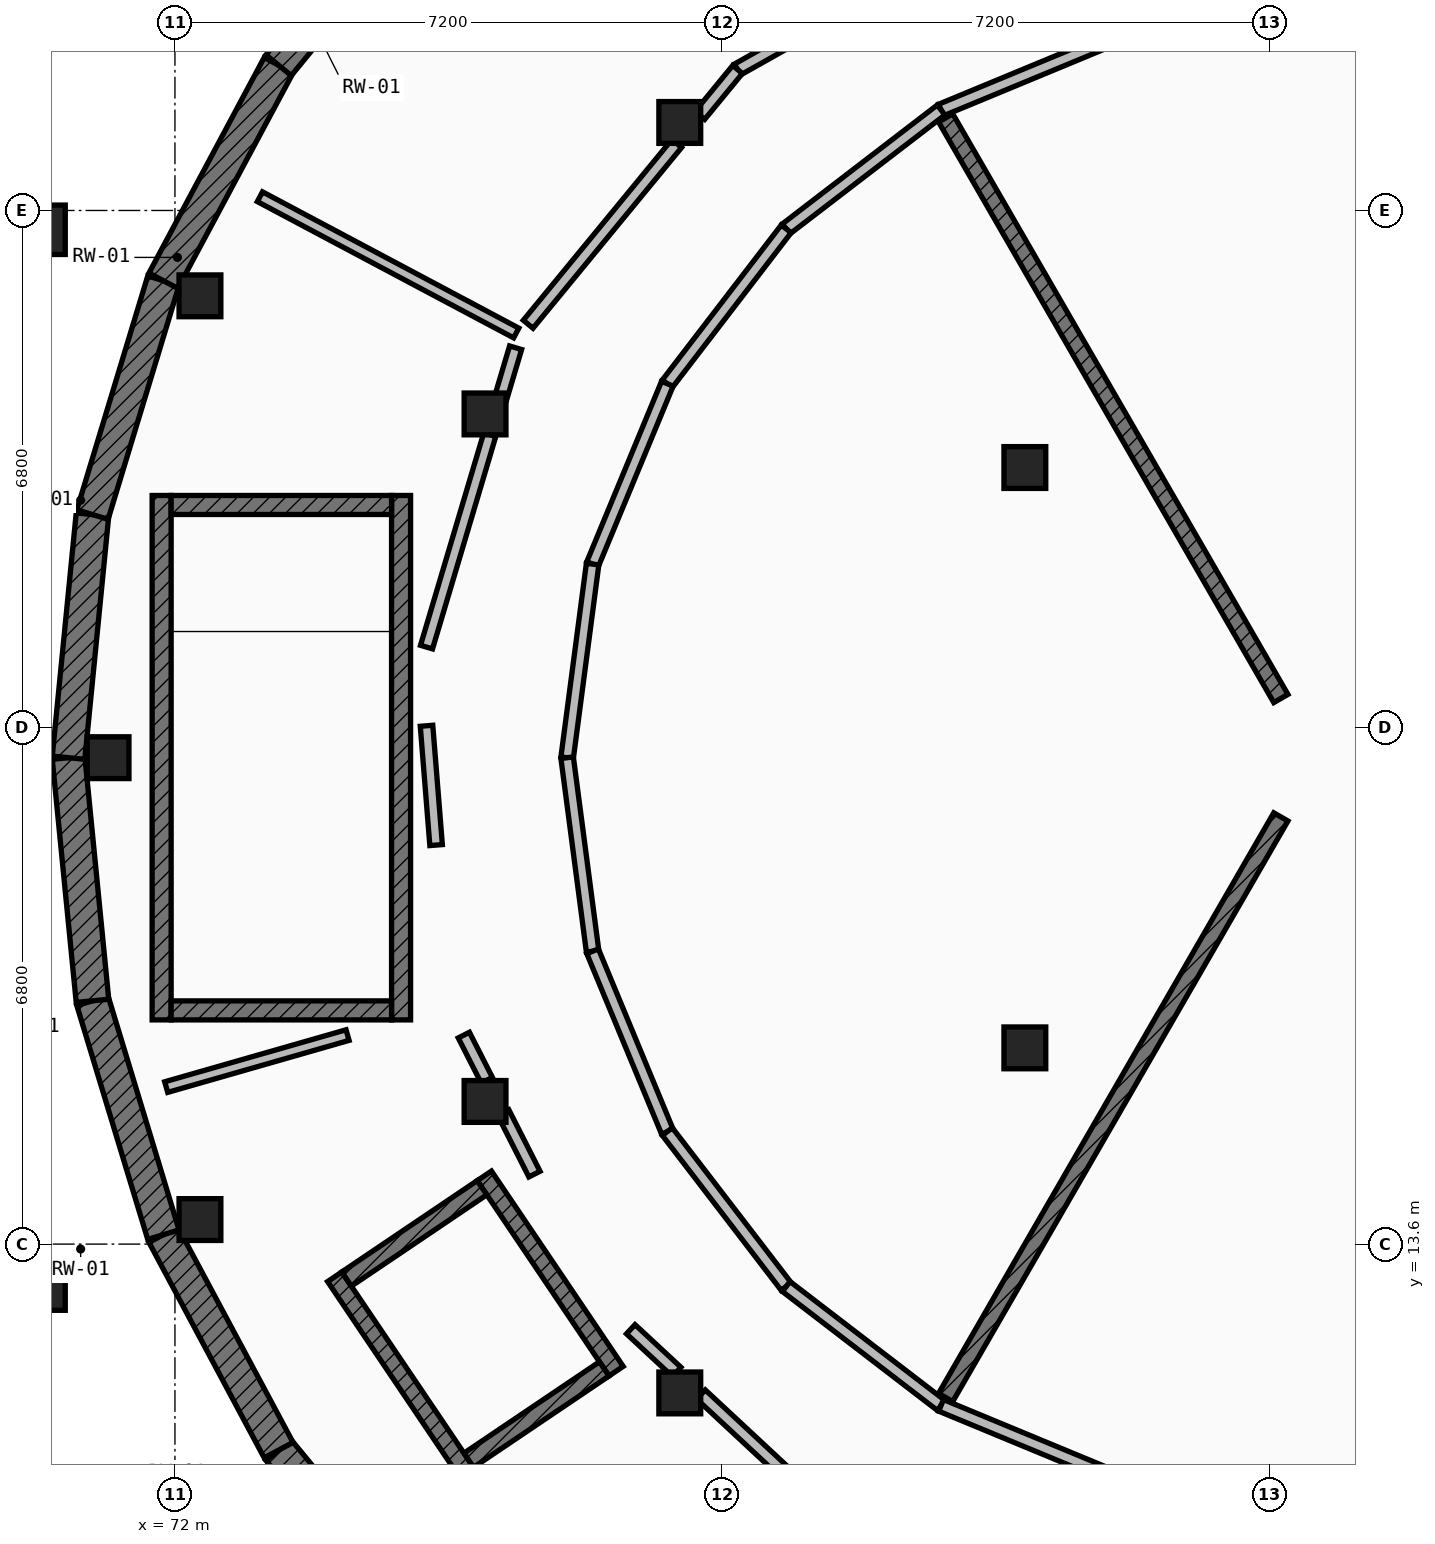
"""IFC4 building model, lengths in metres.
Left out: names, types, materials, properties, quantities, classifications, styles, units other than length and angle.
Written with IfcOpenShell. Run it as: python <this file> out.ifc"""

import sys

from ifc_helpers import new_model, si_unit, direction, frame, frame_2d, origin, origin_2d, place, context, subcontext, project, spatial, rectangle, extrude, element, fill, save


model = new_model("IFC4")
c1 = context("Model", 3, precision=1e-05, world=origin(), true_north=direction((0.0, 1.0)))
c2 = subcontext(c1, "Body", "Model", "MODEL_VIEW")
j1 = project(units=[si_unit("LENGTHUNIT", "METRE"), si_unit("PLANEANGLEUNIT", "RADIAN")], contexts=[c1])
p1 = place(None, origin())
s1 = spatial("IfcSite", under=j1, at=p1, CompositionType="ELEMENT")
p2 = place(p1, origin())
s2 = spatial("IfcBuilding", under=s1, at=p2, CompositionType="ELEMENT")
p3 = place(p2, frame((0.0, 0.0, -4.55)))
s3 = spatial("IfcBuildingStorey", under=s2, at=p3, CompositionType="ELEMENT", Elevation=-4.55)
for number, where, z_axis, x_axis in (
    (1, (72.329, 26.077, 0.0), (0.0, 0.0, 1.0), (1.0, 0.0, 0.0)),
    (2, (71.12, 20.0, 0.0), (0.0, 0.0, 1.0), (1.0, 0.0, 0.0)),
    (3, (72.329, 13.923, 0.0), (0.0, 0.0, 1.0), (1.0, 0.0, 0.0)),
    (4, (78.642, 28.358, 0.0), (0.0, 0.0, 1.0), (1.0, 0.0, 0.0)),
    (5, (76.08, 24.523, 0.0), (0.0, 0.0, 1.0), (1.0, 0.0, 0.0)),
    (6, (76.08, 15.477, 0.0), (0.0, 0.0, 1.0), (1.0, 0.0, 0.0)),
    (7, (78.642, 11.642, 0.0), (0.0, 0.0, 1.0), (1.0, 0.0, 0.0)),
    (8, (83.182, 23.818, 0.0), (0.0, 0.0, 1.0), (1.0, 0.0, 0.0)),
    (9, (83.182, 16.182, 0.0), (0.0, 0.0, 1.0), (1.0, 0.0, 0.0)),
):
    element("IfcColumn", number, at=place(p3, frame(where, z_axis=z_axis, x_axis=x_axis)), inside=s3, PredefinedType="COLUMN", context=c2, shape_type="SweptSolid", body=[
        extrude(rectangle(XDim=0.55, YDim=0.55, at=origin_2d()), origin(), (0.0, 0.0, 1.0), 4.55),
    ])
for number, where, z_axis, x_axis in (
    (10, (70.232, 26.946, 0.0), (0.0, 0.0, 1.0), (1.0, 0.0, 0.0)),
    (11, (70.232, 13.054, 0.0), (0.0, 0.0, 1.0), (1.0, 0.0, 0.0)),
):
    element("IfcColumn", number, at=place(p3, frame(where, z_axis=z_axis, x_axis=x_axis)), inside=s3, PredefinedType="COLUMN", context=c2, shape_type="SweptSolid", body=[
        extrude(rectangle(XDim=0.65, YDim=0.65, at=origin_2d()), origin(), (0.0, 0.0, 1.0), 4.55),
    ])
for number, where, z_axis, x_axis in (
    (12, (75.403, 8.403, 0.0), (0.0, 0.0, 1.0), (-0.634, 0.773, 0.0)),
    (13, (73.364, 10.889, 0.0), (0.0, 0.0, 1.0), (-0.472, 0.882, 0.0)),
    (14, (71.848, 13.724, 0.0), (0.0, 0.0, 1.0), (-0.29, 0.957, 0.0)),
):
    element("IfcWall", number, at=place(p3, frame(where, z_axis=z_axis, x_axis=x_axis)), inside=s3, PredefinedType="USERDEFINED", context=c2, shape_type="SweptSolid", body=[
        extrude(rectangle(XDim=3.215, YDim=0.43, at=frame_2d((1.607, 0.0))), origin(), (0.0, 0.0, 1.0), 3.335),
    ])
for number, where, z_axis, x_axis in (
    (15, (70.915, 16.801, 0.0), (0.0, 0.0, 1.0), (-0.098, 0.995, 0.0)),
    (16, (70.6, 20.0, 0.0), (0.0, 0.0, 1.0), (0.098, 0.995, 0.0)),
):
    element("IfcWall", number, at=place(p3, frame(where, z_axis=z_axis, x_axis=x_axis)), inside=s3, PredefinedType="USERDEFINED", context=c2, shape_type="SweptSolid", body=[
        extrude(rectangle(XDim=3.214, YDim=0.43, at=frame_2d((1.607, 0.0))), origin(), (0.0, 0.0, 1.0), 3.335),
    ])
for number, where, z_axis, x_axis in (
    (17, (70.915, 23.199, 0.0), (0.0, 0.0, 1.0), (0.29, 0.957, 0.0)),
    (18, (71.848, 26.276, 0.0), (0.0, 0.0, 1.0), (0.472, 0.882, 0.0)),
    (19, (73.364, 29.111, 0.0), (0.0, 0.0, 1.0), (0.634, 0.773, 0.0)),
):
    element("IfcWall", number, at=place(p3, frame(where, z_axis=z_axis, x_axis=x_axis)), inside=s3, PredefinedType="USERDEFINED", context=c2, shape_type="SweptSolid", body=[
        extrude(rectangle(XDim=3.215, YDim=0.43, at=frame_2d((1.607, 0.0))), origin(), (0.0, 0.0, 1.0), 3.335),
    ])
p4 = place(p3, frame((74.975, 16.55, 0.0), z_axis=(0.0, 0.0, 1.0), x_axis=(0.0, 1.0, 0.0)))
e20 = element("IfcWall", 20, at=p4, inside=s3, PredefinedType="SHEAR", context=c2, shape_type="SweptSolid", body=[
    extrude(rectangle(XDim=6.9, YDim=0.25, at=frame_2d((3.45, 0.0))), origin(), (0.0, 0.0, 1.0), 4.135),
])
p5 = place(p4, frame((0.43, 0.0, 0.0)))
e21 = element("IfcOpeningElement", 21, at=p5, cuts=e20, PredefinedType="OPENING", context=c2, shape_type="SweptSolid", body=[
    extrude(rectangle(XDim=1.1, YDim=2.15, at=frame_2d((0.55, 1.075))), frame((0.0, 0.135, 0.0), z_axis=(0.0, -1.0, 0.0), x_axis=(1.0, 0.0, 0.0)), (0.0, 0.0, 1.0), 0.27),
])
p6 = place(p3, frame((71.825, 16.55, 0.0), z_axis=(0.0, 0.0, 1.0), x_axis=(0.0, 1.0, 0.0)))
e22 = element("IfcWall", 22, at=p6, inside=s3, PredefinedType="SHEAR", context=c2, shape_type="SweptSolid", body=[
    extrude(rectangle(XDim=6.9, YDim=0.25, at=frame_2d((3.45, 0.0))), origin(), (0.0, 0.0, 1.0), 4.135),
])
for number, where, z_axis, x_axis in (
    (23, (74.85, 16.675, 0.0), (0.0, 0.0, 1.0), (-1.0, 0.0, 0.0)),
    (24, (74.85, 23.325, 0.0), (0.0, 0.0, 1.0), (-1.0, 0.0, 0.0)),
):
    element("IfcWall", number, at=place(p3, frame(where, z_axis=z_axis, x_axis=x_axis)), inside=s3, PredefinedType="SHEAR", context=c2, shape_type="SweptSolid", body=[
        extrude(rectangle(XDim=2.9, YDim=0.25, at=frame_2d((1.45, 0.0))), origin(), (0.0, 0.0, 1.0), 4.135),
    ])
p7 = place(p3, frame((77.804, 11.928, 0.0), z_axis=(0.0, 0.0, 1.0), x_axis=(-0.559054792443, 0.829130712883, 0.0)))
e25 = element("IfcWall", 25, at=p7, inside=s3, PredefinedType="SHEAR", context=c2, shape_type="SweptSolid", body=[
    extrude(rectangle(XDim=3.1, YDim=0.225, at=frame_2d((1.55, 0.0))), origin(), (0.0, 0.0, 1.0), 4.135),
])
p8 = place(p7, frame((0.9, 0.0, 0.0)))
e26 = element("IfcOpeningElement", 26, at=p8, cuts=e25, PredefinedType="OPENING", context=c2, shape_type="SweptSolid", body=[
    extrude(rectangle(XDim=1.3, YDim=2.2, at=frame_2d((0.65, 1.1))), frame((0.0, 0.123, 0.0), z_axis=(0.0, -1.0, 0.0), x_axis=(1.0, 0.0, 0.0)), (0.0, 0.0, 1.0), 0.245),
])
p9 = place(p3, frame((75.835, 10.6, 0.0), z_axis=(0.0, 0.0, 1.0), x_axis=(-0.559091302934, 0.829106093925, 0.0)))
e27 = element("IfcWall", 27, at=p9, inside=s3, PredefinedType="SHEAR", context=c2, shape_type="SweptSolid", body=[
    extrude(rectangle(XDim=3.1, YDim=0.225, at=frame_2d((1.55, 0.0))), origin(), (0.0, 0.0, 1.0), 4.135),
])
p10 = place(p3, frame((77.648, 11.958, 0.0), z_axis=(0.0, 0.0, 1.0), x_axis=(-0.829050086962, -0.559174349652, 0.0)))
e28 = element("IfcWall", 28, at=p10, inside=s3, PredefinedType="SHEAR", context=c2, shape_type="SweptSolid", body=[
    extrude(rectangle(XDim=2.149, YDim=0.225, at=frame_2d((1.075, 0.0))), origin(), (0.0, 0.0, 1.0), 4.135),
])
p11 = place(p3, frame((76.04, 14.342, 0.0), z_axis=(0.0, 0.0, 1.0), x_axis=(-0.828997430928, -0.559252411274, 0.0)))
e29 = element("IfcWall", 29, at=p11, inside=s3, PredefinedType="SHEAR", context=c2, shape_type="SweptSolid", body=[
    extrude(rectangle(XDim=2.15, YDim=0.225, at=frame_2d((1.075, 0.0))), origin(), (0.0, 0.0, 1.0), 4.135),
])
for number, where, z_axis, x_axis in (
    (30, (86.55, 20.779, 0.0), (0.0, 0.0, 1.0), (-0.5, 0.866, 0.0)),
    (31, (86.55, 19.221, 0.0), (0.0, 0.0, 1.0), (-0.5, -0.866, 0.0)),
):
    element("IfcWall", number, at=place(p3, frame(where, z_axis=z_axis, x_axis=x_axis)), inside=s3, PredefinedType="SOLIDWALL", context=c2, shape_type="SweptSolid", body=[
        extrude(rectangle(XDim=8.821, YDim=0.215, at=frame_2d((4.41, 0.0))), origin(), (0.0, 0.0, 1.0), 2.76),
    ])
p12 = place(p3, frame((84.453, 29.505, 0.0), z_axis=(0.0, 0.0, 1.0), x_axis=(-0.923870848353, -0.382704397106, 0.0)))
e32 = element("IfcWall", 32, at=p12, inside=s3, PredefinedType="PARTITIONING", context=c2, shape_type="SweptSolid", body=[
    extrude(rectangle(XDim=2.568, YDim=0.165, at=frame_2d((1.284, 0.0))), origin(), (0.0, 0.0, 1.0), 2.76),
])
for number, where, z_axis, x_axis in (
    (33, (82.08, 28.522, 0.0), (0.0, 0.0, 1.0), (-0.793, -0.609, 0.0)),
    (34, (80.042, 26.958, 0.0), (0.0, 0.0, 1.0), (-0.609, -0.793, 0.0)),
):
    element("IfcWall", number, at=place(p3, frame(where, z_axis=z_axis, x_axis=x_axis)), inside=s3, PredefinedType="PARTITIONING", context=c2, shape_type="SweptSolid", body=[
        extrude(rectangle(XDim=2.569, YDim=0.165, at=frame_2d((1.285, 0.0))), origin(), (0.0, 0.0, 1.0), 2.76),
    ])
p13 = place(p3, frame((78.478, 24.92, 0.0), z_axis=(0.0, 0.0, 1.0), x_axis=(-0.382704397106, -0.923870848353, 0.0)))
e35 = element("IfcWall", 35, at=p13, inside=s3, PredefinedType="PARTITIONING", context=c2, shape_type="SweptSolid", body=[
    extrude(rectangle(XDim=2.568, YDim=0.165, at=frame_2d((1.284, 0.0))), origin(), (0.0, 0.0, 1.0), 2.76),
])
p14 = place(p3, frame((77.495, 22.547, 0.0), z_axis=(0.0, 0.0, 1.0), x_axis=(-0.130476636685, -0.991451384224, 0.0)))
e36 = element("IfcWall", 36, at=p14, inside=s3, PredefinedType="PARTITIONING", context=c2, shape_type="SweptSolid", body=[
    extrude(rectangle(XDim=2.569, YDim=0.165, at=frame_2d((1.285, 0.0))), origin(), (0.0, 0.0, 1.0), 2.76),
])
p15 = place(p14, frame((0.559, 0.0, 0.0)))
e37 = element("IfcOpeningElement", 37, at=p15, cuts=e36, PredefinedType="OPENING", context=c2, shape_type="SweptSolid", body=[
    extrude(rectangle(XDim=1.45, YDim=2.28, at=frame_2d((0.725, 1.14))), frame((0.0, 0.093, 0.0), z_axis=(0.0, -1.0, 0.0), x_axis=(1.0, 0.0, 0.0)), (0.0, 0.0, 1.0), 0.185),
])
p16 = place(p3, frame((77.16, 20.0, 0.0), z_axis=(0.0, 0.0, 1.0), x_axis=(0.130476636685, -0.991451384224, 0.0)))
e38 = element("IfcWall", 38, at=p16, inside=s3, PredefinedType="PARTITIONING", context=c2, shape_type="SweptSolid", body=[
    extrude(rectangle(XDim=2.569, YDim=0.165, at=frame_2d((1.285, 0.0))), origin(), (0.0, 0.0, 1.0), 2.76),
])
p17 = place(p3, frame((77.495, 17.453, 0.0), z_axis=(0.0, 0.0, 1.0), x_axis=(0.382704397106, -0.923870848353, 0.0)))
e39 = element("IfcWall", 39, at=p17, inside=s3, PredefinedType="PARTITIONING", context=c2, shape_type="SweptSolid", body=[
    extrude(rectangle(XDim=2.568, YDim=0.165, at=frame_2d((1.284, 0.0))), origin(), (0.0, 0.0, 1.0), 2.76),
])
for number, where, z_axis, x_axis in (
    (40, (78.478, 15.08, 0.0), (0.0, 0.0, 1.0), (0.609, -0.793, 0.0)),
    (41, (80.042, 13.042, 0.0), (0.0, 0.0, 1.0), (0.793, -0.609, 0.0)),
):
    element("IfcWall", number, at=place(p3, frame(where, z_axis=z_axis, x_axis=x_axis)), inside=s3, PredefinedType="PARTITIONING", context=c2, shape_type="SweptSolid", body=[
        extrude(rectangle(XDim=2.569, YDim=0.165, at=frame_2d((1.285, 0.0))), origin(), (0.0, 0.0, 1.0), 2.76),
    ])
p18 = place(p3, frame((82.08, 11.478, 0.0), z_axis=(0.0, 0.0, 1.0), x_axis=(0.923870848353, -0.382704397106, 0.0)))
e42 = element("IfcWall", 42, at=p18, inside=s3, PredefinedType="PARTITIONING", context=c2, shape_type="SweptSolid", body=[
    extrude(rectangle(XDim=2.568, YDim=0.165, at=frame_2d((1.284, 0.0))), origin(), (0.0, 0.0, 1.0), 2.76),
])
p19 = place(p3, frame((76.49, 25.588, 0.0), z_axis=(0.0, 0.0, 1.0), x_axis=(-0.882920316433, 0.469522858688, 0.0)))
e43 = element("IfcWall", 43, at=p19, inside=s3, PredefinedType="PARTITIONING", context=c2, shape_type="SweptSolid", body=[
    extrude(rectangle(XDim=3.819, YDim=0.145, at=frame_2d((1.91, 0.0))), origin(), (0.0, 0.0, 1.0), 2.76),
])
p20 = place(p3, frame((74.271, 16.35, 0.0), z_axis=(0.0, 0.0, 1.0), x_axis=(-0.96127114667, -0.275604395065, 0.0)))
e44 = element("IfcWall", 44, at=p20, inside=s3, PredefinedType="PARTITIONING", context=c2, shape_type="SweptSolid", body=[
    extrude(rectangle(XDim=2.482, YDim=0.145, at=frame_2d((1.241, 0.0))), origin(), (0.0, 0.0, 1.0), 2.76),
])
p21 = place(p3, frame((82.311, 30.695, 0.0), z_axis=(0.0, 0.0, 1.0), x_axis=(-0.871081128007, -0.491139153836, 0.0)))
e45 = element("IfcWall", 45, at=p21, inside=s3, PredefinedType="PARTITIONING", context=c2, shape_type="SweptSolid", body=[
    extrude(rectangle(XDim=3.339, YDim=0.165, at=frame_2d((1.67, 0.0))), origin(), (0.0, 0.0, 1.0), 2.76),
])
p22 = place(p21, frame((1.08, 0.0, 0.0)))
e46 = element("IfcOpeningElement", 46, at=p22, cuts=e45, PredefinedType="OPENING", context=c2, shape_type="SweptSolid", body=[
    extrude(rectangle(XDim=1.18, YDim=2.2, at=frame_2d((0.59, 1.1))), frame((0.0, 0.093, 0.0), z_axis=(0.0, -1.0, 0.0), x_axis=(1.0, 0.0, 0.0)), (0.0, 0.0, 1.0), 0.185),
])
p23 = place(p3, frame((79.402, 29.055, 0.0), z_axis=(0.0, 0.0, 1.0), x_axis=(-0.634699456668, -0.772759082577, 0.0)))
e47 = element("IfcWall", 47, at=p23, inside=s3, PredefinedType="PARTITIONING", context=c2, shape_type="SweptSolid", body=[
    extrude(rectangle(XDim=0.782, YDim=0.165, at=frame_2d((0.391, 0.0))), origin(), (0.0, 0.0, 1.0), 2.76),
])
p24 = place(p3, frame((78.602, 28.081, 0.0), z_axis=(0.0, 0.0, 1.0), x_axis=(-0.635045466024, -0.772474760806, 0.0)))
e48 = element("IfcWall", 48, at=p24, inside=s3, PredefinedType="PARTITIONING", context=c2, shape_type="SweptSolid", body=[
    extrude(rectangle(XDim=3.079, YDim=0.165, at=frame_2d((1.539, 0.0))), origin(), (0.0, 0.0, 1.0), 2.76),
])
p25 = place(p3, frame((76.482, 25.394, 0.0), z_axis=(0.0, 0.0, 1.0), x_axis=(-0.284901497141, -0.958556799009, 0.0)))
e49 = element("IfcWall", 49, at=p25, inside=s3, PredefinedType="PARTITIONING", context=c2, shape_type="SweptSolid", body=[
    extrude(rectangle(XDim=0.705, YDim=0.165, at=frame_2d((0.353, 0.0))), origin(), (0.0, 0.0, 1.0), 2.76),
])
p26 = place(p3, frame((76.142, 24.25, 0.0), z_axis=(0.0, 0.0, 1.0), x_axis=(-0.285319515422, -0.958432456733, 0.0)))
e50 = element("IfcWall", 50, at=p26, inside=s3, PredefinedType="PARTITIONING", context=c2, shape_type="SweptSolid", body=[
    extrude(rectangle(XDim=2.916, YDim=0.165, at=frame_2d((1.458, 0.0))), origin(), (0.0, 0.0, 1.0), 2.76),
])
p27 = place(p26, frame((0.798, 0.0, 0.0)))
e51 = element("IfcOpeningElement", 51, at=p27, cuts=e50, PredefinedType="OPENING", context=c2, shape_type="SweptSolid", body=[
    extrude(rectangle(XDim=1.32, YDim=2.24, at=frame_2d((0.66, 1.12))), frame((0.0, 0.093, 0.0), z_axis=(0.0, -1.0, 0.0), x_axis=(1.0, 0.0, 0.0)), (0.0, 0.0, 1.0), 0.185),
])
p28 = place(p3, frame((75.31, 20.42, 0.0), z_axis=(0.0, 0.0, 1.0), x_axis=(0.079991678722, -0.996795531358, 0.0)))
e52 = element("IfcWall", 52, at=p28, inside=s3, PredefinedType="PARTITIONING", context=c2, shape_type="SweptSolid", body=[
    extrude(rectangle(XDim=1.575, YDim=0.165, at=frame_2d((0.788, 0.0))), origin(), (0.0, 0.0, 1.0), 2.76),
])
p29 = place(p3, frame((75.801, 16.35, 0.0), z_axis=(0.0, 0.0, 1.0), x_axis=(0.453212137126, -0.891402691695, 0.0)))
e53 = element("IfcWall", 53, at=p29, inside=s3, PredefinedType="PARTITIONING", context=c2, shape_type="SweptSolid", body=[
    extrude(rectangle(XDim=0.666, YDim=0.165, at=frame_2d((0.333, 0.0))), origin(), (0.0, 0.0, 1.0), 2.76),
])
p30 = place(p3, frame((76.319, 15.331, 0.0), z_axis=(0.0, 0.0, 1.0), x_axis=(0.452366842615, -0.891831957099, 0.0)))
e54 = element("IfcWall", 54, at=p30, inside=s3, PredefinedType="PARTITIONING", context=c2, shape_type="SweptSolid", body=[
    extrude(rectangle(XDim=0.908, YDim=0.165, at=frame_2d((0.454, 0.0))), origin(), (0.0, 0.0, 1.0), 2.76),
])
p31 = place(p3, frame((77.997, 12.48, 0.0), z_axis=(0.0, 0.0, 1.0), x_axis=(0.732688002882, -0.680564684973, 0.0)))
e55 = element("IfcWall", 55, at=p31, inside=s3, PredefinedType="PARTITIONING", context=c2, shape_type="SweptSolid", body=[
    extrude(rectangle(XDim=0.824, YDim=0.165, at=frame_2d((0.412, 0.0))), origin(), (0.0, 0.0, 1.0), 2.76),
])
p32 = place(p3, frame((78.921, 11.621, 0.0), z_axis=(0.0, 0.0, 1.0), x_axis=(0.73211336643, -0.681182808572, 0.0)))
e56 = element("IfcWall", 56, at=p32, inside=s3, PredefinedType="PARTITIONING", context=c2, shape_type="SweptSolid", body=[
    extrude(rectangle(XDim=2.277, YDim=0.165, at=frame_2d((1.138, 0.0))), origin(), (0.0, 0.0, 1.0), 2.76),
])
p33 = place(p32, frame((0.659, 0.0, 0.0)))
e57 = element("IfcOpeningElement", 57, at=p33, cuts=e56, PredefinedType="OPENING", context=c2, shape_type="SweptSolid", body=[
    extrude(rectangle(XDim=0.96, YDim=2.12, at=frame_2d((0.48, 1.06))), frame((0.0, 0.093, 0.0), z_axis=(0.0, -1.0, 0.0), x_axis=(1.0, 0.0, 0.0)), (0.0, 0.0, 1.0), 0.185),
])
p34 = place(p5, origin())
e58 = element("IfcDoor", 58, at=p34, inside=s3, OperationType="SINGLE_SWING_LEFT", PredefinedType="DOOR", context=c2, shape_type="SweptSolid", body=[
    extrude(rectangle(XDim=1.1, YDim=2.15, at=frame_2d((0.55, 1.075))), frame((0.0, 0.025, 0.0), z_axis=(0.0, -1.0, 0.0), x_axis=(1.0, 0.0, 0.0)), (0.0, 0.0, 1.0), 0.05),
])
fill(e21, e58)
p35 = place(p8, origin())
e59 = element("IfcDoor", 59, at=p35, inside=s3, OperationType="DOUBLE_DOOR_SLIDING", PredefinedType="DOOR", context=c2, shape_type="SweptSolid", body=[
    extrude(rectangle(XDim=1.3, YDim=2.2, at=frame_2d((0.65, 1.1))), frame((0.0, 0.025, 0.0), z_axis=(0.0, -1.0, 0.0), x_axis=(1.0, 0.0, 0.0)), (0.0, 0.0, 1.0), 0.05),
])
fill(e26, e59)
p36 = place(p15, origin())
e60 = element("IfcDoor", 60, at=p36, inside=s3, OperationType="SINGLE_SWING_RIGHT", PredefinedType="DOOR", context=c2, shape_type="SweptSolid", body=[
    extrude(rectangle(XDim=1.45, YDim=2.28, at=frame_2d((0.725, 1.14))), frame((0.0, 0.025, 0.0), z_axis=(0.0, -1.0, 0.0), x_axis=(1.0, 0.0, 0.0)), (0.0, 0.0, 1.0), 0.05),
])
fill(e37, e60)
p37 = place(p27, origin())
e61 = element("IfcDoor", 61, at=p37, inside=s3, OperationType="SINGLE_SWING_LEFT", PredefinedType="DOOR", context=c2, shape_type="SweptSolid", body=[
    extrude(rectangle(XDim=1.32, YDim=2.24, at=frame_2d((0.66, 1.12))), frame((0.0, 0.025, 0.0), z_axis=(0.0, -1.0, 0.0), x_axis=(1.0, 0.0, 0.0)), (0.0, 0.0, 1.0), 0.05),
])
fill(e51, e61)
p38 = place(p33, origin())
e62 = element("IfcDoor", 62, at=p38, inside=s3, OperationType="SINGLE_SWING_RIGHT", PredefinedType="DOOR", context=c2, shape_type="SweptSolid", body=[
    extrude(rectangle(XDim=0.96, YDim=2.12, at=frame_2d((0.48, 1.06))), frame((0.0, 0.025, 0.0), z_axis=(0.0, -1.0, 0.0), x_axis=(1.0, 0.0, 0.0)), (0.0, 0.0, 1.0), 0.05),
])
fill(e57, e62)
save(model, sys.argv[1])
